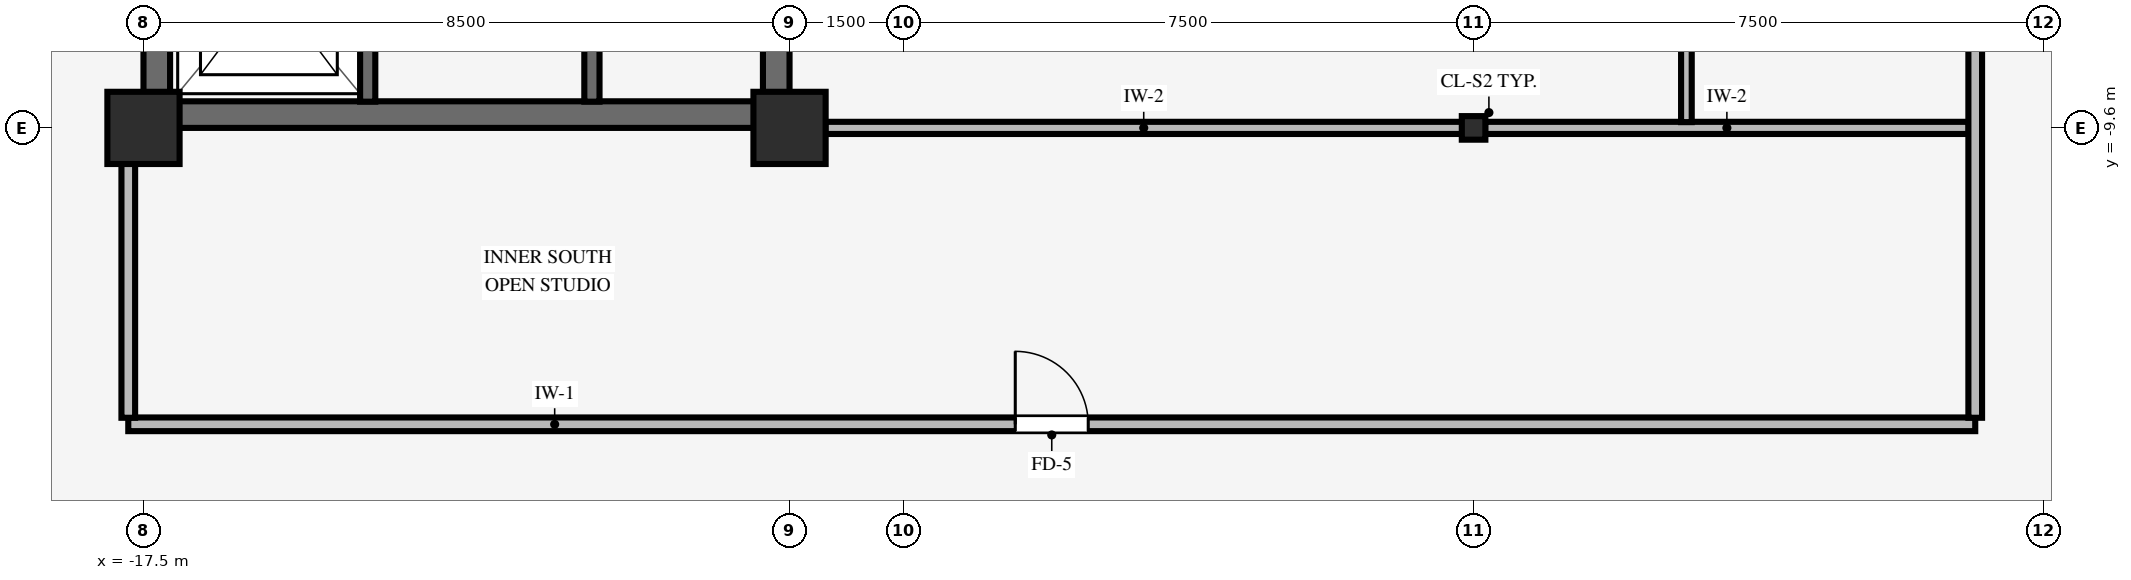
"""IFC4 building model, lengths in metres.
Left out: names, types, materials, properties, quantities, classifications, styles, units other than length and angle.
Written with IfcOpenShell. Run it as: python <this file> out.ifc"""

import sys

from ifc_helpers import new_model, si_unit, direction, frame, frame_2d, origin, origin_2d, place, context, subcontext, project, spatial, rectangle, i_section, extrude, source, transform, mapped, element, fill, save


model = new_model("IFC4")
c1 = context("Model", 3, precision=1e-05, world=origin(), true_north=direction((0.0, 1.0)))
c2 = subcontext(c1, "Body", "Model", "MODEL_VIEW")
j1 = project(units=[si_unit("LENGTHUNIT", "METRE"), si_unit("PLANEANGLEUNIT", "RADIAN")], contexts=[c1])
p1 = place(None, origin())
s1 = spatial("IfcSite", under=j1, at=p1, CompositionType="ELEMENT")
p2 = place(p1, origin())
s2 = spatial("IfcBuilding", under=s1, at=p2, CompositionType="ELEMENT")
p3 = place(p2, frame((0.0, 0.0, 190.9)))
s3 = spatial("IfcBuildingStorey", under=s2, at=p3, CompositionType="ELEMENT", Elevation=190.9)
p4 = place(p3, frame((-17.5, -9.425, 0.0), z_axis=(0.0, 0.0, 1.0), x_axis=(1.0, 0.0, 0.0)))
e1 = element("IfcWall", 1, at=p4, inside=s3, PredefinedType="SHEAR", context=c2, shape_type="SweptSolid", body=[
    extrude(rectangle(XDim=8.5, YDim=0.35, at=frame_2d((4.25, 0.0))), origin(), (0.0, 0.0, 1.0), 3.37),
])
p5 = place(p3, frame((-17.325, -9.255, 0.0), z_axis=(0.0, 0.0, 1.0), x_axis=(0.0, 1.0, 0.0)))
e2 = element("IfcWall", 2, at=p5, inside=s3, PredefinedType="SHEAR", context=c2, shape_type="SweptSolid", body=[
    extrude(rectangle(XDim=18.51, YDim=0.35, at=frame_2d((9.255, 0.0))), origin(), (0.0, 0.0, 1.0), 3.37),
])
p6 = place(p3, frame((-9.175, -9.255, 0.0), z_axis=(0.0, 0.0, 1.0), x_axis=(0.0, 1.0, 0.0)))
e3 = element("IfcWall", 3, at=p6, inside=s3, PredefinedType="SHEAR", context=c2, shape_type="SweptSolid", body=[
    extrude(rectangle(XDim=18.51, YDim=0.35, at=frame_2d((9.255, 0.0))), origin(), (0.0, 0.0, 1.0), 3.37),
])
p7 = place(p6, frame((8.655, 0.0, 0.0)))
e4 = element("IfcOpeningElement", 4, at=p7, cuts=e3, PredefinedType="OPENING", context=c2, shape_type="SweptSolid", body=[
    extrude(rectangle(XDim=1.2, YDim=2.15, at=frame_2d((0.6, 1.075))), frame((0.0, 0.185, 0.0), z_axis=(0.0, -1.0, 0.0), x_axis=(1.0, 0.0, 0.0)), (0.0, 0.0, 1.0), 0.37),
])
for number, where, z_axis, x_axis in (
    (5, (-17.5, -9.6, 0.0), (0.0, 0.0, 1.0), (1.0, 0.0, 0.0)),
    (6, (-9.0, -9.6, 0.0), (0.0, 0.0, 1.0), (1.0, 0.0, 0.0)),
):
    element("IfcColumn", number, at=place(p3, frame(where, z_axis=z_axis, x_axis=x_axis)), inside=s3, PredefinedType="COLUMN", context=c2, shape_type="SweptSolid", body=[
        extrude(rectangle(XDim=0.95, YDim=0.95, at=origin_2d()), origin(), (0.0, 0.0, 1.0), 3.37),
    ])
p8 = place(p3, frame((0.0, -9.6, 0.0), z_axis=(0.0, 0.0, 1.0), x_axis=(1.0, 0.0, 0.0)))
e7 = element("IfcColumn", 7, at=p8, inside=s3, PredefinedType="COLUMN", context=c2, shape_type="SweptSolid", body=[
    extrude(i_section(OverallWidth=0.31, OverallDepth=0.31, WebThickness=0.015, FlangeThickness=0.015, FilletRadius=0.015, at=origin_2d()), origin(), (0.0, 0.0, 1.0), 3.37),
])
p9 = place(p3, frame((-14.55, -9.255, 0.0), z_axis=(0.0, 0.0, 1.0), x_axis=(0.0, 1.0, 0.0)))
e8 = element("IfcWall", 8, at=p9, inside=s3, PredefinedType="SHEAR", context=c2, shape_type="SweptSolid", body=[
    extrude(rectangle(XDim=3.06, YDim=0.2, at=frame_2d((1.53, 0.0))), origin(), (0.0, 0.0, 1.0), 3.37),
])
p10 = place(p9, frame((0.98, 0.0, 0.0)))
e9 = element("IfcOpeningElement", 9, at=p10, cuts=e8, PredefinedType="OPENING", context=c2, shape_type="SweptSolid", body=[
    extrude(rectangle(XDim=1.15, YDim=2.15, at=frame_2d((0.575, 1.075))), frame((0.0, 0.11, 0.0), z_axis=(0.0, -1.0, 0.0), x_axis=(1.0, 0.0, 0.0)), (0.0, 0.0, 1.0), 0.22),
])
p11 = place(p3, frame((-11.6, -9.255, 0.0), z_axis=(0.0, 0.0, 1.0), x_axis=(0.0, 1.0, 0.0)))
e10 = element("IfcWall", 10, at=p11, inside=s3, PredefinedType="SHEAR", context=c2, shape_type="SweptSolid", body=[
    extrude(rectangle(XDim=8.025, YDim=0.2, at=frame_2d((4.012, 0.0))), origin(), (0.0, 0.0, 1.0), 3.37),
])
p12 = place(p11, frame((5.615, 0.0, 0.0)))
e11 = element("IfcOpeningElement", 11, at=p12, cuts=e10, PredefinedType="OPENING", context=c2, shape_type="SweptSolid", body=[
    extrude(rectangle(XDim=0.88, YDim=2.1, at=frame_2d((0.44, 1.05))), frame((0.0, 0.11, 0.0), z_axis=(0.0, -1.0, 0.0), x_axis=(1.0, 0.0, 0.0)), (0.0, 0.0, 1.0), 0.22),
])
p13 = place(p3, frame((-17.7, -13.5, 0.0), z_axis=(0.0, 0.0, 1.0), x_axis=(1.0, 0.0, 0.0)))
e12 = element("IfcWall", 12, at=p13, inside=s3, PredefinedType="PARTITIONING", context=c2, shape_type="SweptSolid", body=[
    extrude(rectangle(XDim=24.3, YDim=0.18, at=frame_2d((12.15, 0.0))), origin(), (0.0, 0.0, 1.0), 3.008),
])
p14 = place(p13, frame((11.67, 0.0, 0.0)))
e13 = element("IfcOpeningElement", 13, at=p14, cuts=e12, PredefinedType="OPENING", context=c2, shape_type="SweptSolid", body=[
    extrude(rectangle(XDim=0.96, YDim=2.1, at=frame_2d((0.48, 1.05))), frame((0.0, 0.1, 0.0), z_axis=(0.0, -1.0, 0.0), x_axis=(1.0, 0.0, 0.0)), (0.0, 0.0, 1.0), 0.2),
])
p15 = place(p3, frame((-8.529, -9.6, 0.0), z_axis=(0.0, 0.0, 1.0), x_axis=(1.0, 0.0, 0.0)))
e14 = element("IfcWall", 14, at=p15, inside=s3, PredefinedType="PARTITIONING", context=c2, shape_type="SweptSolid", body=[
    extrude(rectangle(XDim=8.378, YDim=0.16, at=frame_2d((4.189, 0.0))), origin(), (0.0, 0.0, 1.0), 2.405),
])
p16 = place(p3, frame((0.151, -9.6, 0.0), z_axis=(0.0, 0.0, 1.0), x_axis=(1.0, 0.0, 0.0)))
e15 = element("IfcWall", 15, at=p16, inside=s3, PredefinedType="PARTITIONING", context=c2, shape_type="SweptSolid", body=[
    extrude(rectangle(XDim=6.363, YDim=0.16, at=frame_2d((3.182, 0.0))), origin(), (0.0, 0.0, 1.0), 2.405),
])
p17 = place(p3, frame((-17.7, -13.414, 0.0), z_axis=(0.0, 0.0, 1.0), x_axis=(0.0, 1.0, 0.0)))
e16 = element("IfcWall", 16, at=p17, inside=s3, PredefinedType="PARTITIONING", context=c2, shape_type="SweptSolid", body=[
    extrude(rectangle(XDim=3.343, YDim=0.18, at=frame_2d((1.671, 0.0))), origin(), (0.0, 0.0, 1.0), 2.816),
])
p18 = place(p3, frame((2.8, -9.524, 0.0), z_axis=(0.0, 0.0, 1.0), x_axis=(0.0, 1.0, 0.0)))
e17 = element("IfcWall", 17, at=p18, inside=s3, PredefinedType="PARTITIONING", context=c2, shape_type="SweptSolid", body=[
    extrude(rectangle(XDim=8.188, YDim=0.14, at=frame_2d((4.094, 0.0))), origin(), (0.0, 0.0, 1.0), 3.36),
])
p19 = place(p3, frame((6.6, -13.414, 0.0), z_axis=(0.0, 0.0, 1.0), x_axis=(0.0, 1.0, 0.0)))
e18 = element("IfcWall", 18, at=p19, inside=s3, PredefinedType="PARTITIONING", context=c2, shape_type="SweptSolid", body=[
    extrude(rectangle(XDim=12.078, YDim=0.18, at=frame_2d((6.039, 0.0))), origin(), (0.0, 0.0, 1.0), 3.36),
])
p20 = place(p19, frame((7.466, 0.0, 0.0)))
e19 = element("IfcOpeningElement", 19, at=p20, cuts=e18, PredefinedType="OPENING", context=c2, shape_type="SweptSolid", body=[
    extrude(rectangle(XDim=0.96, YDim=2.1, at=frame_2d((0.48, 1.05))), frame((0.0, 0.1, 0.0), z_axis=(0.0, -1.0, 0.0), x_axis=(1.0, 0.0, 0.0)), (0.0, 0.0, 1.0), 0.2),
])
m1 = source(origin(), c2, "Body", "SweptSolid", [
    extrude(rectangle(XDim=0.96, YDim=2.1, at=frame_2d((0.48, 1.05))), frame((0.0, 0.025, 0.0), z_axis=(0.0, -1.0, 0.0), x_axis=(1.0, 0.0, 0.0)), (0.0, 0.0, 1.0), 0.05),
])
p21 = place(p14, origin())
e20 = element("IfcDoor", 20, at=p21, inside=s3, OperationType="SINGLE_SWING_LEFT", PredefinedType="DOOR", context=c2, shape_type="MappedRepresentation", body=[
    mapped(m1, transform((0.0, 0.0, 0.0), scale=1.0)),
])
fill(e13, e20)
save(model, sys.argv[1])
